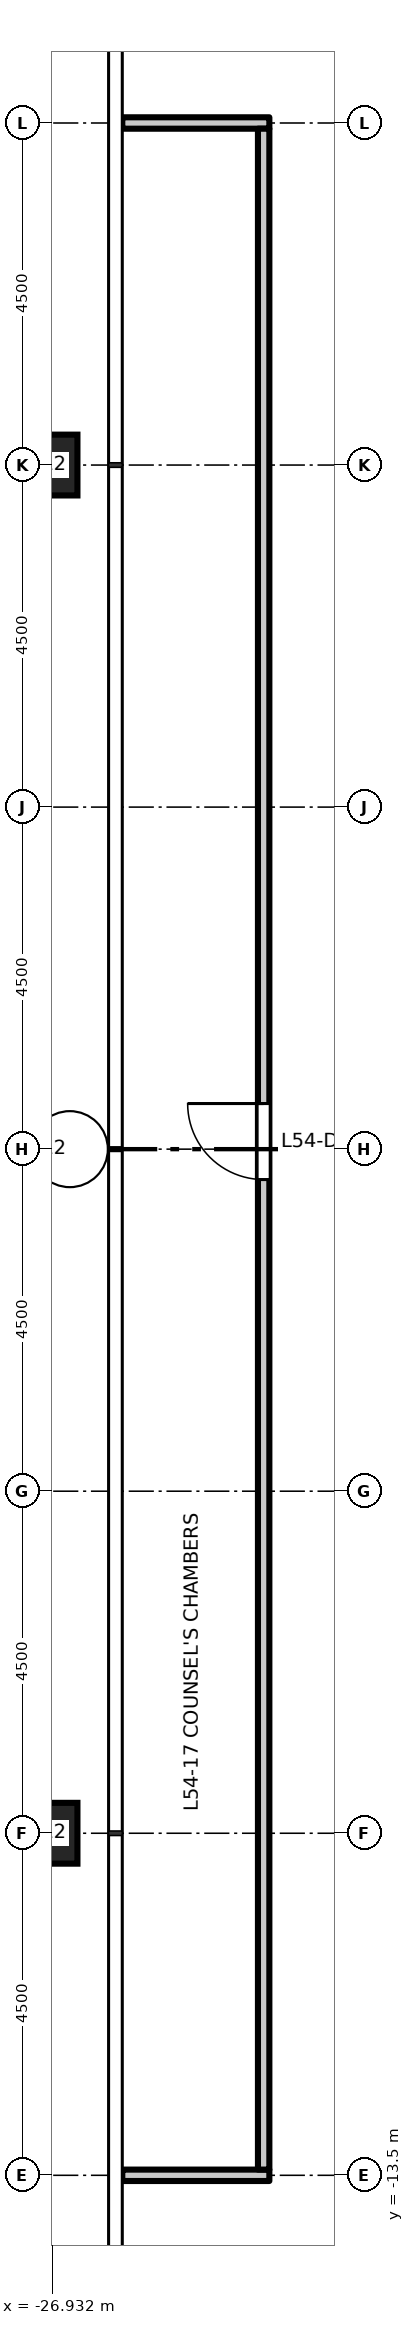
"""IFC4 building model, lengths in metres.
Left out: names, types, materials, properties, quantities, classifications, styles, units other than length and angle.
Written with IfcOpenShell. Run it as: python <this file> out.ifc"""

import sys

from ifc_helpers import new_model, si_unit, direction, frame, frame_2d, origin, origin_2d, place, context, subcontext, project, spatial, rectangle, hollow_rectangle, extrude, element, fill, save


model = new_model("IFC4")
c1 = context("Model", 3, precision=1e-05, world=origin(), true_north=direction((0.0, 1.0)))
c2 = subcontext(c1, "Body", "Model", "MODEL_VIEW")
j1 = project(units=[si_unit("LENGTHUNIT", "METRE"), si_unit("PLANEANGLEUNIT", "RADIAN")], contexts=[c1])
p1 = place(None, origin())
s1 = spatial("IfcSite", under=j1, at=p1, CompositionType="ELEMENT")
p2 = place(p1, origin())
s2 = spatial("IfcBuilding", under=s1, at=p2, CompositionType="ELEMENT")
p3 = place(p2, frame((0.0, 0.0, 251.2)))
s3 = spatial("IfcBuildingStorey", under=s2, at=p3, CompositionType="ELEMENT", Elevation=251.2)
for number, where, z_axis, x_axis in (
    (1, (-27.0, 9.0, 0.0), (0.0, 0.0, 1.0), (1.0, 0.0, 0.0)),
    (2, (-27.0, 0.0, 0.0), (0.0, 0.0, 1.0), (1.0, 0.0, 0.0)),
    (3, (-27.0, -9.0, 0.0), (0.0, 0.0, 1.0), (1.0, 0.0, 0.0)),
):
    element("IfcColumn", number, at=place(p3, frame(where, z_axis=z_axis, x_axis=x_axis)), inside=s3, PredefinedType="COLUMN", context=c2, shape_type="SweptSolid", body=[
        extrude(hollow_rectangle(XDim=0.8, YDim=0.8, WallThickness=0.045, at=origin_2d()), origin(), (0.0, 0.0, 1.0), 4.5),
    ])
p4 = place(p3, frame((-26.01, -13.5, 0.0), z_axis=(0.0, 0.0, 1.0), x_axis=(1.0, 0.0, 0.0)))
e4 = element("IfcWall", 4, at=p4, inside=s3, PredefinedType="PARTITIONING", context=c2, shape_type="SweptSolid", body=[
    extrude(rectangle(XDim=1.935, YDim=0.15, at=frame_2d((0.968, 0.0))), origin(), (0.0, 0.0, 1.0), 3.95),
])
p5 = place(p3, frame((-26.01, 13.5, 0.0), z_axis=(0.0, 0.0, 1.0), x_axis=(1.0, 0.0, 0.0)))
e5 = element("IfcWall", 5, at=p5, inside=s3, PredefinedType="PARTITIONING", context=c2, shape_type="SweptSolid", body=[
    extrude(rectangle(XDim=1.935, YDim=0.15, at=frame_2d((0.968, 0.0))), origin(), (0.0, 0.0, 1.0), 4.35),
])
p6 = place(p3, frame((-24.15, -13.425, 0.0), z_axis=(0.0, 0.0, 1.0), x_axis=(0.0, 1.0, 0.0)))
e6 = element("IfcWall", 6, at=p6, inside=s3, PredefinedType="PARTITIONING", context=c2, shape_type="SweptSolid", body=[
    extrude(rectangle(XDim=26.85, YDim=0.15, at=frame_2d((13.425, 0.0))), origin(), (0.0, 0.0, 1.0), 4.35),
])
p7 = place(p6, frame((13.025, 0.0, 0.0)))
e7 = element("IfcOpeningElement", 7, at=p7, cuts=e6, PredefinedType="OPENING", context=c2, shape_type="SweptSolid", body=[
    extrude(rectangle(XDim=1.0, YDim=2.1, at=frame_2d((0.5, 1.05))), frame((0.0, 0.085, 0.0), z_axis=(0.0, -1.0, 0.0), x_axis=(1.0, 0.0, 0.0)), (0.0, 0.0, 1.0), 0.17),
])
p8 = place(p7, origin())
e8 = element("IfcDoor", 8, at=p8, inside=s3, OperationType="SINGLE_SWING_RIGHT", PredefinedType="DOOR", context=c2, shape_type="SweptSolid", body=[
    extrude(rectangle(XDim=1.0, YDim=2.1, at=frame_2d((0.5, 1.05))), frame((0.0, 0.025, 0.0), z_axis=(0.0, -1.0, 0.0), x_axis=(1.0, 0.0, 0.0)), (0.0, 0.0, 1.0), 0.05),
])
fill(e7, e8)
save(model, sys.argv[1])
